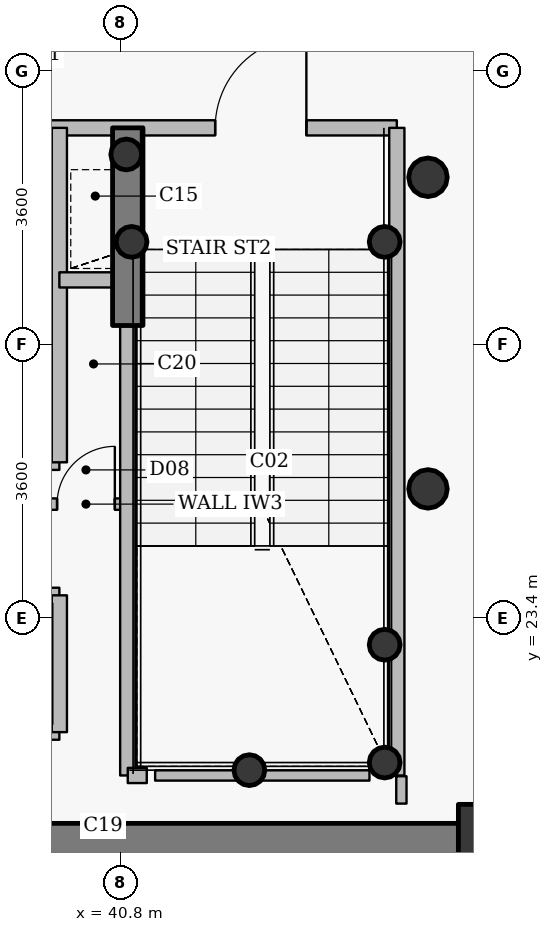
"""IFC4 building model, lengths in metres.
Left out: names, types, materials, properties, quantities, classifications, styles, units other than length and angle.
Written with IfcOpenShell. Run it as: python <this file> out.ifc"""

import sys

from ifc_helpers import new_model, si_unit, direction, frame, frame_2d, origin, origin_2d, place, context, subcontext, project, spatial, rectangle, hollow_circle, extrude, source, transform, mapped, element, fill, save


model = new_model("IFC4")
c1 = context("Model", 3, precision=1e-05, world=origin(), true_north=direction((0.0, 1.0)))
c2 = subcontext(c1, "Body", "Model", "MODEL_VIEW")
j1 = project(units=[si_unit("LENGTHUNIT", "METRE"), si_unit("PLANEANGLEUNIT", "RADIAN")], contexts=[c1])
p1 = place(None, origin())
s1 = spatial("IfcSite", under=j1, at=p1, CompositionType="ELEMENT")
p2 = place(p1, origin())
s2 = spatial("IfcBuilding", under=s1, at=p2, CompositionType="ELEMENT")
p3 = place(p2, frame((0.0, 0.0, 32.4)))
s3 = spatial("IfcBuildingStorey", under=s2, at=p3, CompositionType="ELEMENT", Elevation=32.4)
p4 = place(p3, frame((45.95, 20.25, 0.0), z_axis=(0.0, 0.0, 1.0), x_axis=(1.0, 0.0, 0.0)))
e1 = element("IfcColumn", 1, at=p4, inside=s3, PredefinedType="COLUMN", context=c2, shape_type="SweptSolid", body=[
    extrude(rectangle(XDim=1.4, YDim=1.4, at=origin_2d()), origin(), (0.0, 0.0, 1.0), 4.2),
])
for number, where, z_axis, x_axis in (
    (2, (44.28, 21.5, 0.0), (0.0, 0.0, 1.0), (1.0, 0.0, 0.0)),
    (3, (44.28, 23.05, 0.0), (0.0, 0.0, 1.0), (1.0, 0.0, 0.0)),
    (4, (42.5, 21.4, 0.0), (0.0, 0.0, 1.0), (1.0, 0.0, 0.0)),
    (5, (40.95, 28.35, 0.0), (0.0, 0.0, 1.0), (1.0, 0.0, 0.0)),
    (6, (44.28, 28.35, 0.0), (0.0, 0.0, 1.0), (1.0, 0.0, 0.0)),
    (7, (40.88, 29.5, 0.0), (0.0, 0.0, 1.0), (1.0, 0.0, 0.0)),
):
    element("IfcColumn", number, at=place(p3, frame(where, z_axis=z_axis, x_axis=x_axis)), inside=s3, PredefinedType="COLUMN", context=c2, shape_type="SweptSolid", body=[
        extrude(hollow_circle(Radius=0.203, WallThickness=0.016, at=origin_2d()), origin(), (0.0, 0.0, 1.0), 4.2),
    ])
p5 = place(p3, frame((45.25, 20.25, 0.0), z_axis=(0.0, 0.0, 1.0), x_axis=(-1.0, 0.0, 0.0)))
e8 = element("IfcWall", 8, at=p5, inside=s3, PredefinedType="SHEAR", context=c2, shape_type="SweptSolid", body=[
    extrude(rectangle(XDim=18.5, YDim=0.9, at=frame_2d((9.25, 0.0))), origin(), (0.0, 0.0, 1.0), 3.4),
])
p6 = place(p5, frame((10.0, 0.0, 0.0)))
e9 = element("IfcOpeningElement", 9, at=p6, cuts=e8, PredefinedType="OPENING", context=c2, shape_type="SweptSolid", body=[
    extrude(rectangle(XDim=1.15, YDim=2.15, at=origin_2d()), frame((0.575, 0.46, 1.075), z_axis=(0.0, -1.0, 0.0), x_axis=(1.0, 0.0, 0.0)), (0.0, 0.0, 1.0), 0.92),
])
p7 = place(p3, frame((40.9, 27.25, 0.0), z_axis=(0.0, 0.0, 1.0), x_axis=(0.0, 1.0, 0.0)))
e10 = element("IfcWall", 10, at=p7, inside=s3, PredefinedType="SHEAR", context=c2, shape_type="SweptSolid", body=[
    extrude(rectangle(XDim=2.6, YDim=0.4, at=frame_2d((1.3, 0.0))), origin(), (0.0, 0.0, 1.0), 3.55),
])
for number, where, z_axis, x_axis in (
    (11, (44.85, 25.1, 0.0), (0.0, 0.0, 1.0), (1.0, 0.0, 0.0)),
    (12, (44.85, 29.2, 0.0), (0.0, 0.0, 1.0), (1.0, 0.0, 0.0)),
):
    element("IfcColumn", number, at=place(p3, frame(where, z_axis=z_axis, x_axis=x_axis)), inside=s3, PredefinedType="COLUMN", context=c2, shape_type="SweptSolid", body=[
        extrude(hollow_circle(Radius=0.254, WallThickness=0.02, at=origin_2d()), origin(), (0.0, 0.0, 1.0), 4.2),
    ])
p8 = place(p3, frame((35.05, 27.25, 0.0), z_axis=(0.0, 0.0, 1.0), x_axis=(1.0, 0.0, 0.0)))
e13 = element("IfcWall", 13, at=p8, inside=s3, PredefinedType="PARTITIONING", context=c2, shape_type="SweptSolid", body=[
    extrude(rectangle(XDim=4.95, YDim=0.2, at=frame_2d((2.475, 0.0))), origin(), (0.0, 0.0, 1.0), 3.535),
])
p9 = place(p3, frame((35.45, 23.7, 0.0), z_axis=(0.0, 0.0, 1.0), x_axis=(1.0, 0.0, 0.0)))
e14 = element("IfcWall", 14, at=p9, inside=s3, PredefinedType="PARTITIONING", context=c2, shape_type="SweptSolid", body=[
    extrude(rectangle(XDim=4.55, YDim=0.2, at=frame_2d((2.275, 0.0))), origin(), (0.0, 0.0, 1.0), 3.535),
])
p10 = place(p9, frame((0.25, 0.0, 0.0)))
e15 = element("IfcOpeningElement", 15, at=p10, cuts=e14, PredefinedType="OPENING", context=c2, shape_type="SweptSolid", body=[
    extrude(rectangle(XDim=1.05, YDim=2.15, at=origin_2d()), frame((0.525, 0.11, 1.075), z_axis=(0.0, -1.0, 0.0), x_axis=(1.0, 0.0, 0.0)), (0.0, 0.0, 1.0), 0.22),
])
p11 = place(p9, frame((1.745, 0.0, 0.0)))
e16 = element("IfcOpeningElement", 16, at=p11, cuts=e14, PredefinedType="OPENING", context=c2, shape_type="SweptSolid", body=[
    extrude(rectangle(XDim=1.05, YDim=2.15, at=origin_2d()), frame((0.525, 0.11, 1.075), z_axis=(0.0, -1.0, 0.0), x_axis=(1.0, 0.0, 0.0)), (0.0, 0.0, 1.0), 0.22),
])
p12 = place(p9, frame((3.165, 0.0, 0.0)))
e17 = element("IfcOpeningElement", 17, at=p12, cuts=e14, PredefinedType="OPENING", context=c2, shape_type="SweptSolid", body=[
    extrude(rectangle(XDim=1.05, YDim=2.15, at=origin_2d()), frame((0.525, 0.11, 1.075), z_axis=(0.0, -1.0, 0.0), x_axis=(1.0, 0.0, 0.0)), (0.0, 0.0, 1.0), 0.22),
])
p13 = place(p3, frame((35.45, 25.45, 0.0), z_axis=(0.0, 0.0, 1.0), x_axis=(1.0, 0.0, 0.0)))
e18 = element("IfcWall", 18, at=p13, inside=s3, PredefinedType="PARTITIONING", context=c2, shape_type="SweptSolid", body=[
    extrude(rectangle(XDim=4.55, YDim=0.2, at=frame_2d((2.275, 0.0))), origin(), (0.0, 0.0, 1.0), 3.535),
])
p14 = place(p3, frame((35.95, 29.85, 0.0), z_axis=(0.0, 0.0, 1.0), x_axis=(1.0, 0.0, 0.0)))
e19 = element("IfcWall", 19, at=p14, inside=s3, PredefinedType="PARTITIONING", context=c2, shape_type="SweptSolid", body=[
    extrude(rectangle(XDim=8.49, YDim=0.2, at=frame_2d((4.245, 0.0))), origin(), (0.0, 0.0, 1.0), 3.535),
])
p15 = place(p14, frame((6.1, 0.0, 0.0)))
e20 = element("IfcOpeningElement", 20, at=p15, cuts=e19, PredefinedType="OPENING", context=c2, shape_type="SweptSolid", body=[
    extrude(rectangle(XDim=1.2, YDim=2.15, at=origin_2d()), frame((0.6, 0.11, 1.075), z_axis=(0.0, -1.0, 0.0), x_axis=(1.0, 0.0, 0.0)), (0.0, 0.0, 1.0), 0.22),
])
p16 = place(p14, frame((0.37, 0.0, 0.0)))
e21 = element("IfcOpeningElement", 21, at=p16, cuts=e19, PredefinedType="OPENING", context=c2, shape_type="SweptSolid", body=[
    extrude(rectangle(XDim=1.15, YDim=2.15, at=origin_2d()), frame((0.575, 0.11, 1.075), z_axis=(0.0, -1.0, 0.0), x_axis=(1.0, 0.0, 0.0)), (0.0, 0.0, 1.0), 0.22),
])
p17 = place(p14, frame((2.425, 0.0, 0.0)))
e22 = element("IfcOpeningElement", 22, at=p17, cuts=e19, PredefinedType="OPENING", context=c2, shape_type="SweptSolid", body=[
    extrude(rectangle(XDim=1.05, YDim=2.15, at=origin_2d()), frame((0.525, 0.11, 1.075), z_axis=(0.0, -1.0, 0.0), x_axis=(1.0, 0.0, 0.0)), (0.0, 0.0, 1.0), 0.22),
])
p18 = place(p3, frame((39.8, 21.9, 0.0), z_axis=(0.0, 0.0, 1.0), x_axis=(1.0, 0.0, 0.0)))
e23 = element("IfcWall", 23, at=p18, inside=s3, PredefinedType="PARTITIONING", context=c2, shape_type="SweptSolid", body=[
    extrude(rectangle(XDim=0.2, YDim=0.2, at=frame_2d((0.1, 0.0))), origin(), (0.0, 0.0, 1.0), 3.95),
])
p19 = place(p3, frame((39.8, 24.9, 0.0), z_axis=(0.0, 0.0, 1.0), x_axis=(1.0, 0.0, 0.0)))
e24 = element("IfcWall", 24, at=p19, inside=s3, PredefinedType="PARTITIONING", context=c2, shape_type="SweptSolid", body=[
    extrude(rectangle(XDim=1.1, YDim=0.15, at=frame_2d((0.55, 0.0))), origin(), (0.0, 0.0, 1.0), 3.95),
])
p20 = place(p19, frame((0.17, 0.0, 0.0)))
e25 = element("IfcOpeningElement", 25, at=p20, cuts=e24, PredefinedType="OPENING", context=c2, shape_type="SweptSolid", body=[
    extrude(rectangle(XDim=0.76, YDim=2.1, at=origin_2d()), frame((0.38, 0.085, 1.05), z_axis=(0.0, -1.0, 0.0), x_axis=(1.0, 0.0, 0.0)), (0.0, 0.0, 1.0), 0.17),
])
p21 = place(p3, frame((40.0, 21.9, 0.0), z_axis=(0.0, 0.0, 1.0), x_axis=(0.0, 1.0, 0.0)))
e26 = element("IfcWall", 26, at=p21, inside=s3, PredefinedType="PARTITIONING", context=c2, shape_type="SweptSolid", body=[
    extrude(rectangle(XDim=1.8, YDim=0.2, at=frame_2d((0.9, 0.0))), origin(), (0.0, 0.0, 1.0), 3.95),
])
p22 = place(p3, frame((40.0, 25.45, 0.0), z_axis=(0.0, 0.0, 1.0), x_axis=(0.0, 1.0, 0.0)))
e27 = element("IfcWall", 27, at=p22, inside=s3, PredefinedType="PARTITIONING", context=c2, shape_type="SweptSolid", body=[
    extrude(rectangle(XDim=4.4, YDim=0.2, at=frame_2d((2.2, 0.0))), origin(), (0.0, 0.0, 1.0), 3.95),
])
p23 = place(p3, frame((40.0, 27.85, 0.0), z_axis=(0.0, 0.0, 1.0), x_axis=(1.0, 0.0, 0.0)))
e28 = element("IfcWall", 28, at=p23, inside=s3, PredefinedType="PARTITIONING", context=c2, shape_type="SweptSolid", body=[
    extrude(rectangle(XDim=0.9, YDim=0.2, at=frame_2d((0.45, 0.0))), origin(), (0.0, 0.0, 1.0), 3.95),
])
p24 = place(p3, frame((40.9, 21.33, 0.0), z_axis=(0.0, 0.0, 1.0), x_axis=(0.0, 1.0, 0.0)))
e29 = element("IfcWall", 29, at=p24, inside=s3, PredefinedType="PARTITIONING", context=c2, shape_type="SweptSolid", body=[
    extrude(rectangle(XDim=5.91, YDim=0.2, at=frame_2d((2.955, 0.0))), origin(), (0.0, 0.0, 1.0), 3.485),
])
p25 = place(p3, frame((40.9, 21.33, 0.0), z_axis=(0.0, 0.0, 1.0), x_axis=(1.0, 0.0, 0.0)))
e30 = element("IfcWall", 30, at=p25, inside=s3, PredefinedType="PARTITIONING", context=c2, shape_type="SweptSolid", body=[
    extrude(rectangle(XDim=0.25, YDim=0.2, at=frame_2d((0.125, 0.0))), origin(), (0.0, 0.0, 1.0), 3.485),
])
p26 = place(p3, frame((44.44, 21.33, 0.0), z_axis=(0.0, 0.0, 1.0), x_axis=(0.0, 1.0, 0.0)))
e31 = element("IfcWall", 31, at=p26, inside=s3, PredefinedType="PARTITIONING", context=c2, shape_type="SweptSolid", body=[
    extrude(rectangle(XDim=8.52, YDim=0.2, at=frame_2d((4.26, 0.0))), origin(), (0.0, 0.0, 1.0), 3.95),
])
p27 = place(p3, frame((44.08, 21.33, 0.0), z_axis=(0.0, 0.0, 1.0), x_axis=(-1.0, 0.0, 0.0)))
e32 = element("IfcWall", 32, at=p27, inside=s3, PredefinedType="PARTITIONING", context=c2, shape_type="SweptSolid", body=[
    extrude(rectangle(XDim=2.82, YDim=0.135, at=frame_2d((1.41, 0.0))), origin(), (0.0, 0.0, 1.0), 3.485),
])
p28 = place(p3, frame((44.5, 20.96, 0.0), z_axis=(0.0, 0.0, 1.0), x_axis=(0.0, 1.0, 0.0)))
e33 = element("IfcWall", 33, at=p28, inside=s3, PredefinedType="PARTITIONING", context=c2, shape_type="SweptSolid", body=[
    extrude(rectangle(XDim=0.36, YDim=0.135, at=frame_2d((0.18, 0.0))), origin(), (0.0, 0.0, 1.0), 3.95),
])
m1 = source(origin(), c2, "Body", "SweptSolid", [
    extrude(rectangle(XDim=1.2, YDim=2.15, at=origin_2d()), frame((0.6, 0.025, 1.075), z_axis=(0.0, -1.0, 0.0), x_axis=(1.0, 0.0, 0.0)), (0.0, 0.0, 1.0), 0.05),
])
p29 = place(p15, origin())
e34 = element("IfcDoor", 34, at=p29, inside=s3, OperationType="SINGLE_SWING_RIGHT", PredefinedType="DOOR", context=c2, shape_type="MappedRepresentation", body=[
    mapped(m1, transform((0.0, 0.0, 0.0), x_axis=(1.0, 0.0, 0.0), y_axis=(0.0, 1.0, 0.0), z_axis=(0.0, 0.0, 1.0), scale=1.0)),
])
fill(e20, e34)
m2 = source(origin(), c2, "Body", "SweptSolid", [
    extrude(rectangle(XDim=0.76, YDim=2.1, at=origin_2d()), frame((0.38, 0.025, 1.05), z_axis=(0.0, -1.0, 0.0), x_axis=(1.0, 0.0, 0.0)), (0.0, 0.0, 1.0), 0.05),
])
p30 = place(p20, origin())
e35 = element("IfcDoor", 35, at=p30, inside=s3, OperationType="SINGLE_SWING_LEFT", PredefinedType="DOOR", context=c2, shape_type="MappedRepresentation", body=[
    mapped(m2, transform((0.0, 0.0, 0.0), x_axis=(1.0, 0.0, 0.0), y_axis=(0.0, 1.0, 0.0), z_axis=(0.0, 0.0, 1.0), scale=1.0)),
])
fill(e25, e35)
save(model, sys.argv[1])
